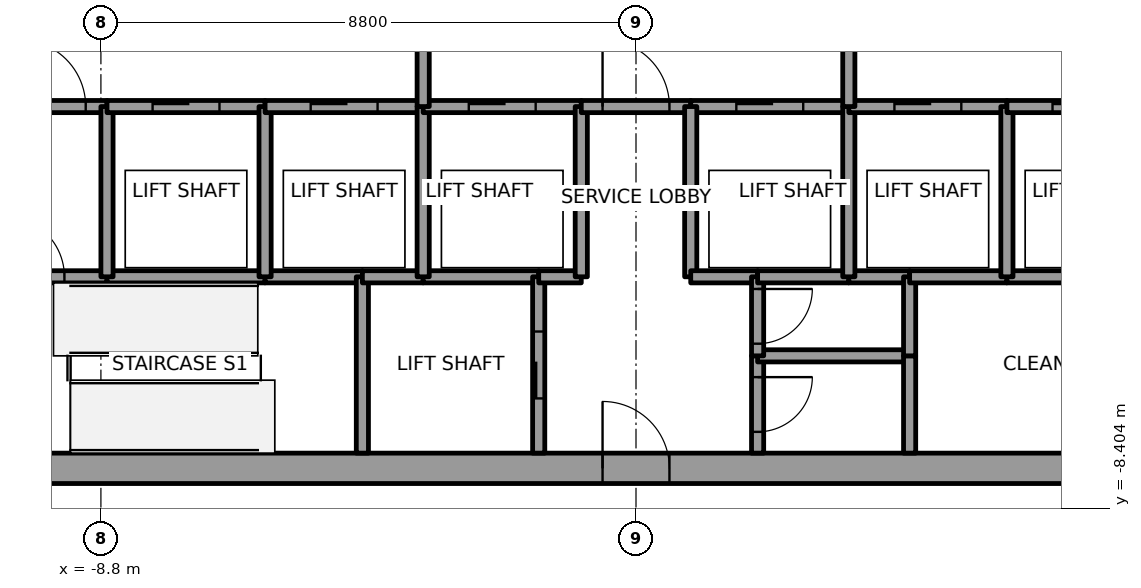
"""IFC4 building model, lengths in metres.
Left out: names, types, materials, properties, quantities, classifications, styles, units other than length and angle.
Written with IfcOpenShell. Run it as: python <this file> out.ifc"""

import sys

from ifc_helpers import new_model, si_unit, direction, frame, frame_2d, origin, place, context, subcontext, project, spatial, rectangle, extrude, element, fill, save


model = new_model("IFC4")
c1 = context("Model", 3, precision=1e-05, world=origin(), true_north=direction((0.0, 1.0)))
c2 = subcontext(c1, "Body", "Model", "MODEL_VIEW")
j1 = project(units=[si_unit("LENGTHUNIT", "METRE"), si_unit("PLANEANGLEUNIT", "RADIAN")], contexts=[c1])
p1 = place(None, origin())
s1 = spatial("IfcSite", under=j1, at=p1, CompositionType="ELEMENT")
p2 = place(p1, origin())
s2 = spatial("IfcBuilding", under=s1, at=p2, CompositionType="ELEMENT")
p3 = place(p2, frame((0.0, 0.0, 227.0)))
s3 = spatial("IfcBuildingStorey", under=s2, at=p3, CompositionType="ELEMENT", Elevation=227.0)
p4 = place(p3, frame((-11.0, -7.75, 0.0), z_axis=(0.0, 0.0, 1.0), x_axis=(1.0, 0.0, 0.0)))
e1 = element("IfcWall", 1, at=p4, inside=s3, PredefinedType="SHEAR", context=c2, shape_type="SweptSolid", body=[
    extrude(rectangle(XDim=22.0, YDim=0.5, at=frame_2d((11.0, 0.0))), origin(), (0.0, 0.0, 1.0), 4.0),
])
p5 = place(p4, frame((10.45, 0.0, 0.0)))
e2 = element("IfcOpeningElement", 2, at=p5, cuts=e1, PredefinedType="OPENING", context=c2, shape_type="SweptSolid", body=[
    extrude(rectangle(XDim=1.1, YDim=2.1, at=frame_2d((0.55, 1.05))), frame((0.0, 0.25, 0.0), z_axis=(0.0, -1.0, 0.0), x_axis=(1.0, 0.0, 0.0)), (0.0, 0.0, 1.0), 0.5),
])
p6 = place(p3, frame((-10.5, -4.6, 0.0), z_axis=(0.0, 0.0, 1.0), x_axis=(1.0, 0.0, 0.0)))
e3 = element("IfcWall", 3, at=p6, inside=s3, PredefinedType="SOLIDWALL", context=c2, shape_type="SweptSolid", body=[
    extrude(rectangle(XDim=1.8, YDim=0.2, at=frame_2d((0.9, 0.0))), origin(), (0.0, 0.0, 1.0), 3.85),
])
p7 = place(p6, frame((0.1, 0.0, 0.0)))
e4 = element("IfcOpeningElement", 4, at=p7, cuts=e3, PredefinedType="OPENING", context=c2, shape_type="SweptSolid", body=[
    extrude(rectangle(XDim=1.0, YDim=2.1, at=frame_2d((0.5, 1.05))), frame((0.0, 0.1, 0.0), z_axis=(0.0, -1.0, 0.0), x_axis=(1.0, 0.0, 0.0)), (0.0, 0.0, 1.0), 0.2),
])
p8 = place(p3, frame((-10.5, -1.8, 0.0), z_axis=(0.0, 0.0, 1.0), x_axis=(1.0, 0.0, 0.0)))
e5 = element("IfcWall", 5, at=p8, inside=s3, PredefinedType="SOLIDWALL", context=c2, shape_type="SweptSolid", body=[
    extrude(rectangle(XDim=1.8, YDim=0.2, at=frame_2d((0.9, 0.0))), origin(), (0.0, 0.0, 1.0), 3.85),
])
p9 = place(p8, frame((0.35, 0.0, 0.0)))
e6 = element("IfcOpeningElement", 6, at=p9, cuts=e5, PredefinedType="OPENING", context=c2, shape_type="SweptSolid", body=[
    extrude(rectangle(XDim=1.1, YDim=2.1, at=frame_2d((0.55, 1.05))), frame((0.0, 0.1, 0.0), z_axis=(0.0, -1.0, 0.0), x_axis=(1.0, 0.0, 0.0)), (0.0, 0.0, 1.0), 0.2),
])
p10 = place(p3, frame((-8.7, -4.6, 0.0), z_axis=(0.0, 0.0, 1.0), x_axis=(1.0, 0.0, 0.0)))
e7 = element("IfcWall", 7, at=p10, inside=s3, PredefinedType="SOLIDWALL", context=c2, shape_type="SweptSolid", body=[
    extrude(rectangle(XDim=2.6, YDim=0.2, at=frame_2d((1.3, 0.0))), origin(), (0.0, 0.0, 1.0), 3.85),
])
p11 = place(p3, frame((-8.7, -4.6, 0.0), z_axis=(0.0, 0.0, 1.0), x_axis=(0.0, 1.0, 0.0)))
e8 = element("IfcWall", 8, at=p11, inside=s3, PredefinedType="SOLIDWALL", context=c2, shape_type="SweptSolid", body=[
    extrude(rectangle(XDim=2.8, YDim=0.2, at=frame_2d((1.4, 0.0))), origin(), (0.0, 0.0, 1.0), 3.85),
])
p12 = place(p3, frame((-8.7, -1.8, 0.0), z_axis=(0.0, 0.0, 1.0), x_axis=(1.0, 0.0, 0.0)))
e9 = element("IfcWall", 9, at=p12, inside=s3, PredefinedType="SOLIDWALL", context=c2, shape_type="SweptSolid", body=[
    extrude(rectangle(XDim=2.6, YDim=0.2, at=frame_2d((1.3, 0.0))), origin(), (0.0, 0.0, 1.0), 3.85),
])
p13 = place(p12, frame((0.75, 0.0, 0.0)))
e10 = element("IfcOpeningElement", 10, at=p13, cuts=e9, PredefinedType="OPENING", context=c2, shape_type="SweptSolid", body=[
    extrude(rectangle(XDim=1.1, YDim=2.1, at=frame_2d((0.55, 1.05))), frame((0.0, 0.1, 0.0), z_axis=(0.0, -1.0, 0.0), x_axis=(1.0, 0.0, 0.0)), (0.0, 0.0, 1.0), 0.2),
])
p14 = place(p3, frame((-6.1, -4.6, 0.0), z_axis=(0.0, 0.0, 1.0), x_axis=(1.0, 0.0, 0.0)))
e11 = element("IfcWall", 11, at=p14, inside=s3, PredefinedType="SOLIDWALL", context=c2, shape_type="SweptSolid", body=[
    extrude(rectangle(XDim=1.6, YDim=0.2, at=frame_2d((0.8, 0.0))), origin(), (0.0, 0.0, 1.0), 3.85),
])
p15 = place(p3, frame((-6.1, -4.6, 0.0), z_axis=(0.0, 0.0, 1.0), x_axis=(0.0, 1.0, 0.0)))
e12 = element("IfcWall", 12, at=p15, inside=s3, PredefinedType="SOLIDWALL", context=c2, shape_type="SweptSolid", body=[
    extrude(rectangle(XDim=2.8, YDim=0.2, at=frame_2d((1.4, 0.0))), origin(), (0.0, 0.0, 1.0), 3.85),
])
p16 = place(p3, frame((-6.1, -1.8, 0.0), z_axis=(0.0, 0.0, 1.0), x_axis=(1.0, 0.0, 0.0)))
e13 = element("IfcWall", 13, at=p16, inside=s3, PredefinedType="SOLIDWALL", context=c2, shape_type="SweptSolid", body=[
    extrude(rectangle(XDim=2.6, YDim=0.2, at=frame_2d((1.3, 0.0))), origin(), (0.0, 0.0, 1.0), 3.85),
])
p17 = place(p16, frame((0.75, 0.0, 0.0)))
e14 = element("IfcOpeningElement", 14, at=p17, cuts=e13, PredefinedType="OPENING", context=c2, shape_type="SweptSolid", body=[
    extrude(rectangle(XDim=1.1, YDim=2.1, at=frame_2d((0.55, 1.05))), frame((0.0, 0.1, 0.0), z_axis=(0.0, -1.0, 0.0), x_axis=(1.0, 0.0, 0.0)), (0.0, 0.0, 1.0), 0.2),
])
p18 = place(p3, frame((-4.5, -4.6, 0.0), z_axis=(0.0, 0.0, 1.0), x_axis=(0.0, -1.0, 0.0)))
e15 = element("IfcWall", 15, at=p18, inside=s3, PredefinedType="SOLIDWALL", context=c2, shape_type="SweptSolid", body=[
    extrude(rectangle(XDim=2.9, YDim=0.2, at=frame_2d((1.45, 0.0))), origin(), (0.0, 0.0, 1.0), 3.85),
])
p19 = place(p3, frame((-4.5, -4.6, 0.0), z_axis=(0.0, 0.0, 1.0), x_axis=(1.0, 0.0, 0.0)))
e16 = element("IfcWall", 16, at=p19, inside=s3, PredefinedType="SOLIDWALL", context=c2, shape_type="SweptSolid", body=[
    extrude(rectangle(XDim=1.0, YDim=0.2, at=frame_2d((0.5, 0.0))), origin(), (0.0, 0.0, 1.0), 3.85),
])
p20 = place(p3, frame((-3.5, -4.6, 0.0), z_axis=(0.0, 0.0, 1.0), x_axis=(1.0, 0.0, 0.0)))
e17 = element("IfcWall", 17, at=p20, inside=s3, PredefinedType="SOLIDWALL", context=c2, shape_type="SweptSolid", body=[
    extrude(rectangle(XDim=1.9, YDim=0.2, at=frame_2d((0.95, 0.0))), origin(), (0.0, 0.0, 1.0), 3.85),
])
p21 = place(p3, frame((-3.5, -4.6, 0.0), z_axis=(0.0, 0.0, 1.0), x_axis=(0.0, 1.0, 0.0)))
e18 = element("IfcWall", 18, at=p21, inside=s3, PredefinedType="SOLIDWALL", context=c2, shape_type="SweptSolid", body=[
    extrude(rectangle(XDim=2.8, YDim=0.2, at=frame_2d((1.4, 0.0))), origin(), (0.0, 0.0, 1.0), 3.85),
])
p22 = place(p3, frame((-3.5, -1.8, 0.0), z_axis=(0.0, 0.0, 1.0), x_axis=(1.0, 0.0, 0.0)))
e19 = element("IfcWall", 19, at=p22, inside=s3, PredefinedType="SOLIDWALL", context=c2, shape_type="SweptSolid", body=[
    extrude(rectangle(XDim=2.6, YDim=0.2, at=frame_2d((1.3, 0.0))), origin(), (0.0, 0.0, 1.0), 3.85),
])
p23 = place(p22, frame((0.75, 0.0, 0.0)))
e20 = element("IfcOpeningElement", 20, at=p23, cuts=e19, PredefinedType="OPENING", context=c2, shape_type="SweptSolid", body=[
    extrude(rectangle(XDim=1.1, YDim=2.1, at=frame_2d((0.55, 1.05))), frame((0.0, 0.1, 0.0), z_axis=(0.0, -1.0, 0.0), x_axis=(1.0, 0.0, 0.0)), (0.0, 0.0, 1.0), 0.2),
])
p24 = place(p3, frame((-3.5, 1.8, 0.0), z_axis=(0.0, 0.0, 1.0), x_axis=(0.0, -1.0, 0.0)))
e21 = element("IfcWall", 21, at=p24, inside=s3, PredefinedType="SOLIDWALL", context=c2, shape_type="SweptSolid", body=[
    extrude(rectangle(XDim=3.6, YDim=0.2, at=frame_2d((1.8, 0.0))), origin(), (0.0, 0.0, 1.0), 3.85),
])
p25 = place(p24, frame((1.05, 0.0, 0.0)))
e22 = element("IfcOpeningElement", 22, at=p25, cuts=e21, PredefinedType="OPENING", context=c2, shape_type="SweptSolid", body=[
    extrude(rectangle(XDim=1.5, YDim=2.1, at=frame_2d((0.75, 1.05))), frame((0.0, 0.1, 0.0), z_axis=(0.0, -1.0, 0.0), x_axis=(1.0, 0.0, 0.0)), (0.0, 0.0, 1.0), 0.2),
])
p26 = place(p3, frame((-1.6, -7.5, 0.0), z_axis=(0.0, 0.0, 1.0), x_axis=(0.0, 1.0, 0.0)))
e23 = element("IfcWall", 23, at=p26, inside=s3, PredefinedType="SOLIDWALL", context=c2, shape_type="SweptSolid", body=[
    extrude(rectangle(XDim=2.9, YDim=0.2, at=frame_2d((1.45, 0.0))), origin(), (0.0, 0.0, 1.0), 3.85),
])
p27 = place(p26, frame((0.9, 0.0, 0.0)))
e24 = element("IfcOpeningElement", 24, at=p27, cuts=e23, PredefinedType="OPENING", context=c2, shape_type="SweptSolid", body=[
    extrude(rectangle(XDim=1.1, YDim=2.1, at=frame_2d((0.55, 1.05))), frame((0.0, 0.1, 0.0), z_axis=(0.0, -1.0, 0.0), x_axis=(1.0, 0.0, 0.0)), (0.0, 0.0, 1.0), 0.2),
])
p28 = place(p3, frame((-1.6, -4.6, 0.0), z_axis=(0.0, 0.0, 1.0), x_axis=(1.0, 0.0, 0.0)))
e25 = element("IfcWall", 25, at=p28, inside=s3, PredefinedType="SOLIDWALL", context=c2, shape_type="SweptSolid", body=[
    extrude(rectangle(XDim=0.7, YDim=0.2, at=frame_2d((0.35, 0.0))), origin(), (0.0, 0.0, 1.0), 3.85),
])
p29 = place(p3, frame((-0.9, -4.6, 0.0), z_axis=(0.0, 0.0, 1.0), x_axis=(0.0, 1.0, 0.0)))
e26 = element("IfcWall", 26, at=p29, inside=s3, PredefinedType="SOLIDWALL", context=c2, shape_type="SweptSolid", body=[
    extrude(rectangle(XDim=2.8, YDim=0.2, at=frame_2d((1.4, 0.0))), origin(), (0.0, 0.0, 1.0), 3.85),
])
p30 = place(p3, frame((-0.9, -1.8, 0.0), z_axis=(0.0, 0.0, 1.0), x_axis=(1.0, 0.0, 0.0)))
e27 = element("IfcWall", 27, at=p30, inside=s3, PredefinedType="SOLIDWALL", context=c2, shape_type="SweptSolid", body=[
    extrude(rectangle(XDim=1.8, YDim=0.2, at=frame_2d((0.9, 0.0))), origin(), (0.0, 0.0, 1.0), 3.85),
])
p31 = place(p30, frame((0.35, 0.0, 0.0)))
e28 = element("IfcOpeningElement", 28, at=p31, cuts=e27, PredefinedType="OPENING", context=c2, shape_type="SweptSolid", body=[
    extrude(rectangle(XDim=1.1, YDim=2.1, at=frame_2d((0.55, 1.05))), frame((0.0, 0.1, 0.0), z_axis=(0.0, -1.0, 0.0), x_axis=(1.0, 0.0, 0.0)), (0.0, 0.0, 1.0), 0.2),
])
p32 = place(p3, frame((0.9, -1.8, 0.0), z_axis=(0.0, 0.0, 1.0), x_axis=(1.0, 0.0, 0.0)))
e29 = element("IfcWall", 29, at=p32, inside=s3, PredefinedType="SOLIDWALL", context=c2, shape_type="SweptSolid", body=[
    extrude(rectangle(XDim=2.6, YDim=0.2, at=frame_2d((1.3, 0.0))), origin(), (0.0, 0.0, 1.0), 3.85),
])
p33 = place(p32, frame((0.75, 0.0, 0.0)))
e30 = element("IfcOpeningElement", 30, at=p33, cuts=e29, PredefinedType="OPENING", context=c2, shape_type="SweptSolid", body=[
    extrude(rectangle(XDim=1.1, YDim=2.1, at=frame_2d((0.55, 1.05))), frame((0.0, 0.1, 0.0), z_axis=(0.0, -1.0, 0.0), x_axis=(1.0, 0.0, 0.0)), (0.0, 0.0, 1.0), 0.2),
])
p34 = place(p3, frame((0.9, -1.8, 0.0), z_axis=(0.0, 0.0, 1.0), x_axis=(0.0, -1.0, 0.0)))
e31 = element("IfcWall", 31, at=p34, inside=s3, PredefinedType="SOLIDWALL", context=c2, shape_type="SweptSolid", body=[
    extrude(rectangle(XDim=2.8, YDim=0.2, at=frame_2d((1.4, 0.0))), origin(), (0.0, 0.0, 1.0), 3.85),
])
p35 = place(p3, frame((0.9, -4.6, 0.0), z_axis=(0.0, 0.0, 1.0), x_axis=(1.0, 0.0, 0.0)))
e32 = element("IfcWall", 32, at=p35, inside=s3, PredefinedType="SOLIDWALL", context=c2, shape_type="SweptSolid", body=[
    extrude(rectangle(XDim=1.1, YDim=0.2, at=frame_2d((0.55, 0.0))), origin(), (0.0, 0.0, 1.0), 3.85),
])
p36 = place(p3, frame((2.0, -5.9, 0.0), z_axis=(0.0, 0.0, 1.0), x_axis=(0.0, -1.0, 0.0)))
e33 = element("IfcWall", 33, at=p36, inside=s3, PredefinedType="SOLIDWALL", context=c2, shape_type="SweptSolid", body=[
    extrude(rectangle(XDim=1.6, YDim=0.2, at=frame_2d((0.8, 0.0))), origin(), (0.0, 0.0, 1.0), 3.85),
])
p37 = place(p36, frame((0.35, 0.0, 0.0)))
e34 = element("IfcOpeningElement", 34, at=p37, cuts=e33, PredefinedType="OPENING", context=c2, shape_type="SweptSolid", body=[
    extrude(rectangle(XDim=0.9, YDim=2.1, at=frame_2d((0.45, 1.05))), frame((0.0, 0.1, 0.0), z_axis=(0.0, -1.0, 0.0), x_axis=(1.0, 0.0, 0.0)), (0.0, 0.0, 1.0), 0.2),
])
p38 = place(p3, frame((4.5, -5.9, 0.0), z_axis=(0.0, 0.0, 1.0), x_axis=(-1.0, 0.0, 0.0)))
e35 = element("IfcWall", 35, at=p38, inside=s3, PredefinedType="SOLIDWALL", context=c2, shape_type="SweptSolid", body=[
    extrude(rectangle(XDim=2.5, YDim=0.2, at=frame_2d((1.25, 0.0))), origin(), (0.0, 0.0, 1.0), 3.85),
])
p39 = place(p3, frame((2.0, -4.6, 0.0), z_axis=(0.0, 0.0, 1.0), x_axis=(0.0, -1.0, 0.0)))
e36 = element("IfcWall", 36, at=p39, inside=s3, PredefinedType="SOLIDWALL", context=c2, shape_type="SweptSolid", body=[
    extrude(rectangle(XDim=1.3, YDim=0.2, at=frame_2d((0.65, 0.0))), origin(), (0.0, 0.0, 1.0), 3.85),
])
p40 = place(p39, frame((0.2, 0.0, 0.0)))
e37 = element("IfcOpeningElement", 37, at=p40, cuts=e36, PredefinedType="OPENING", context=c2, shape_type="SweptSolid", body=[
    extrude(rectangle(XDim=0.9, YDim=2.1, at=frame_2d((0.45, 1.05))), frame((0.0, 0.1, 0.0), z_axis=(0.0, -1.0, 0.0), x_axis=(1.0, 0.0, 0.0)), (0.0, 0.0, 1.0), 0.2),
])
p41 = place(p3, frame((3.5, -4.6, 0.0), z_axis=(0.0, 0.0, 1.0), x_axis=(-1.0, 0.0, 0.0)))
e38 = element("IfcWall", 38, at=p41, inside=s3, PredefinedType="SOLIDWALL", context=c2, shape_type="SweptSolid", body=[
    extrude(rectangle(XDim=1.5, YDim=0.2, at=frame_2d((0.75, 0.0))), origin(), (0.0, 0.0, 1.0), 3.85),
])
p42 = place(p3, frame((4.5, -4.6, 0.0), z_axis=(0.0, 0.0, 1.0), x_axis=(-1.0, 0.0, 0.0)))
e39 = element("IfcWall", 39, at=p42, inside=s3, PredefinedType="SOLIDWALL", context=c2, shape_type="SweptSolid", body=[
    extrude(rectangle(XDim=1.0, YDim=0.2, at=frame_2d((0.5, 0.0))), origin(), (0.0, 0.0, 1.0), 3.85),
])
p43 = place(p3, frame((3.5, -4.6, 0.0), z_axis=(0.0, 0.0, 1.0), x_axis=(0.0, 1.0, 0.0)))
e40 = element("IfcWall", 40, at=p43, inside=s3, PredefinedType="SOLIDWALL", context=c2, shape_type="SweptSolid", body=[
    extrude(rectangle(XDim=2.8, YDim=0.2, at=frame_2d((1.4, 0.0))), origin(), (0.0, 0.0, 1.0), 3.85),
])
p44 = place(p3, frame((3.5, -1.8, 0.0), z_axis=(0.0, 0.0, 1.0), x_axis=(1.0, 0.0, 0.0)))
e41 = element("IfcWall", 41, at=p44, inside=s3, PredefinedType="SOLIDWALL", context=c2, shape_type="SweptSolid", body=[
    extrude(rectangle(XDim=2.6, YDim=0.2, at=frame_2d((1.3, 0.0))), origin(), (0.0, 0.0, 1.0), 3.85),
])
p45 = place(p44, frame((0.75, 0.0, 0.0)))
e42 = element("IfcOpeningElement", 42, at=p45, cuts=e41, PredefinedType="OPENING", context=c2, shape_type="SweptSolid", body=[
    extrude(rectangle(XDim=1.1, YDim=2.1, at=frame_2d((0.55, 1.05))), frame((0.0, 0.1, 0.0), z_axis=(0.0, -1.0, 0.0), x_axis=(1.0, 0.0, 0.0)), (0.0, 0.0, 1.0), 0.2),
])
p46 = place(p3, frame((3.5, -1.8, 0.0), z_axis=(0.0, 0.0, 1.0), x_axis=(0.0, 1.0, 0.0)))
e43 = element("IfcWall", 43, at=p46, inside=s3, PredefinedType="SOLIDWALL", context=c2, shape_type="SweptSolid", body=[
    extrude(rectangle(XDim=3.6, YDim=0.2, at=frame_2d((1.8, 0.0))), origin(), (0.0, 0.0, 1.0), 3.85),
])
p47 = place(p46, frame((1.05, 0.0, 0.0)))
e44 = element("IfcOpeningElement", 44, at=p47, cuts=e43, PredefinedType="OPENING", context=c2, shape_type="SweptSolid", body=[
    extrude(rectangle(XDim=1.5, YDim=2.1, at=frame_2d((0.75, 1.05))), frame((0.0, 0.1, 0.0), z_axis=(0.0, -1.0, 0.0), x_axis=(1.0, 0.0, 0.0)), (0.0, 0.0, 1.0), 0.2),
])
p48 = place(p3, frame((4.5, -5.9, 0.0), z_axis=(0.0, 0.0, 1.0), x_axis=(0.0, -1.0, 0.0)))
e45 = element("IfcWall", 45, at=p48, inside=s3, PredefinedType="SOLIDWALL", context=c2, shape_type="SweptSolid", body=[
    extrude(rectangle(XDim=1.6, YDim=0.2, at=frame_2d((0.8, 0.0))), origin(), (0.0, 0.0, 1.0), 3.85),
])
p49 = place(p3, frame((4.5, -4.6, 0.0), z_axis=(0.0, 0.0, 1.0), x_axis=(0.0, -1.0, 0.0)))
e46 = element("IfcWall", 46, at=p49, inside=s3, PredefinedType="SOLIDWALL", context=c2, shape_type="SweptSolid", body=[
    extrude(rectangle(XDim=1.3, YDim=0.2, at=frame_2d((0.65, 0.0))), origin(), (0.0, 0.0, 1.0), 3.85),
])
p50 = place(p3, frame((6.1, -4.6, 0.0), z_axis=(0.0, 0.0, 1.0), x_axis=(-1.0, 0.0, 0.0)))
e47 = element("IfcWall", 47, at=p50, inside=s3, PredefinedType="SOLIDWALL", context=c2, shape_type="SweptSolid", body=[
    extrude(rectangle(XDim=1.6, YDim=0.2, at=frame_2d((0.8, 0.0))), origin(), (0.0, 0.0, 1.0), 3.85),
])
p51 = place(p3, frame((8.7, -4.6, 0.0), z_axis=(0.0, 0.0, 1.0), x_axis=(-1.0, 0.0, 0.0)))
e48 = element("IfcWall", 48, at=p51, inside=s3, PredefinedType="SOLIDWALL", context=c2, shape_type="SweptSolid", body=[
    extrude(rectangle(XDim=2.6, YDim=0.2, at=frame_2d((1.3, 0.0))), origin(), (0.0, 0.0, 1.0), 3.85),
])
p52 = place(p3, frame((6.1, -4.6, 0.0), z_axis=(0.0, 0.0, 1.0), x_axis=(0.0, 1.0, 0.0)))
e49 = element("IfcWall", 49, at=p52, inside=s3, PredefinedType="SOLIDWALL", context=c2, shape_type="SweptSolid", body=[
    extrude(rectangle(XDim=2.8, YDim=0.2, at=frame_2d((1.4, 0.0))), origin(), (0.0, 0.0, 1.0), 3.85),
])
p53 = place(p3, frame((6.1, -1.8, 0.0), z_axis=(0.0, 0.0, 1.0), x_axis=(1.0, 0.0, 0.0)))
e50 = element("IfcWall", 50, at=p53, inside=s3, PredefinedType="SOLIDWALL", context=c2, shape_type="SweptSolid", body=[
    extrude(rectangle(XDim=2.6, YDim=0.2, at=frame_2d((1.3, 0.0))), origin(), (0.0, 0.0, 1.0), 3.85),
])
p54 = place(p53, frame((0.75, 0.0, 0.0)))
e51 = element("IfcOpeningElement", 51, at=p54, cuts=e50, PredefinedType="OPENING", context=c2, shape_type="SweptSolid", body=[
    extrude(rectangle(XDim=1.1, YDim=2.1, at=frame_2d((0.55, 1.05))), frame((0.0, 0.1, 0.0), z_axis=(0.0, -1.0, 0.0), x_axis=(1.0, 0.0, 0.0)), (0.0, 0.0, 1.0), 0.2),
])
p55 = place(p13, origin())
e52 = element("IfcDoor", 52, at=p55, inside=s3, OperationType="SLIDING_TO_LEFT", PredefinedType="DOOR", context=c2, shape_type="SweptSolid", body=[
    extrude(rectangle(XDim=1.1, YDim=2.1, at=frame_2d((0.55, 1.05))), frame((0.0, 0.025, 0.0), z_axis=(0.0, -1.0, 0.0), x_axis=(1.0, 0.0, 0.0)), (0.0, 0.0, 1.0), 0.05),
])
fill(e10, e52)
p56 = place(p17, origin())
e53 = element("IfcDoor", 53, at=p56, inside=s3, OperationType="SLIDING_TO_RIGHT", PredefinedType="DOOR", context=c2, shape_type="SweptSolid", body=[
    extrude(rectangle(XDim=1.1, YDim=2.1, at=frame_2d((0.55, 1.05))), frame((0.0, 0.025, 0.0), z_axis=(0.0, -1.0, 0.0), x_axis=(1.0, 0.0, 0.0)), (0.0, 0.0, 1.0), 0.05),
])
fill(e14, e53)
p57 = place(p23, origin())
e54 = element("IfcDoor", 54, at=p57, inside=s3, OperationType="SLIDING_TO_RIGHT", PredefinedType="DOOR", context=c2, shape_type="SweptSolid", body=[
    extrude(rectangle(XDim=1.1, YDim=2.1, at=frame_2d((0.55, 1.05))), frame((0.0, 0.025, 0.0), z_axis=(0.0, -1.0, 0.0), x_axis=(1.0, 0.0, 0.0)), (0.0, 0.0, 1.0), 0.05),
])
fill(e20, e54)
p58 = place(p33, origin())
e55 = element("IfcDoor", 55, at=p58, inside=s3, OperationType="SLIDING_TO_LEFT", PredefinedType="DOOR", context=c2, shape_type="SweptSolid", body=[
    extrude(rectangle(XDim=1.1, YDim=2.1, at=frame_2d((0.55, 1.05))), frame((0.0, 0.025, 0.0), z_axis=(0.0, -1.0, 0.0), x_axis=(1.0, 0.0, 0.0)), (0.0, 0.0, 1.0), 0.05),
])
fill(e30, e55)
p59 = place(p45, origin())
e56 = element("IfcDoor", 56, at=p59, inside=s3, OperationType="SLIDING_TO_RIGHT", PredefinedType="DOOR", context=c2, shape_type="SweptSolid", body=[
    extrude(rectangle(XDim=1.1, YDim=2.1, at=frame_2d((0.55, 1.05))), frame((0.0, 0.025, 0.0), z_axis=(0.0, -1.0, 0.0), x_axis=(1.0, 0.0, 0.0)), (0.0, 0.0, 1.0), 0.05),
])
fill(e42, e56)
p60 = place(p54, origin())
e57 = element("IfcDoor", 57, at=p60, inside=s3, OperationType="SLIDING_TO_LEFT", PredefinedType="DOOR", context=c2, shape_type="SweptSolid", body=[
    extrude(rectangle(XDim=1.1, YDim=2.1, at=frame_2d((0.55, 1.05))), frame((0.0, 0.025, 0.0), z_axis=(0.0, -1.0, 0.0), x_axis=(1.0, 0.0, 0.0)), (0.0, 0.0, 1.0), 0.05),
])
fill(e51, e57)
p61 = place(p27, origin())
e58 = element("IfcDoor", 58, at=p61, inside=s3, OperationType="SLIDING_TO_RIGHT", PredefinedType="DOOR", context=c2, shape_type="SweptSolid", body=[
    extrude(rectangle(XDim=1.1, YDim=2.1, at=frame_2d((0.55, 1.05))), frame((0.0, 0.025, 0.0), z_axis=(0.0, -1.0, 0.0), x_axis=(1.0, 0.0, 0.0)), (0.0, 0.0, 1.0), 0.05),
])
fill(e24, e58)
p62 = place(p9, origin())
e59 = element("IfcDoor", 59, at=p62, inside=s3, OperationType="SINGLE_SWING_LEFT", PredefinedType="DOOR", context=c2, shape_type="SweptSolid", body=[
    extrude(rectangle(XDim=1.1, YDim=2.1, at=frame_2d((0.55, 1.05))), frame((0.0, 0.025, 0.0), z_axis=(0.0, -1.0, 0.0), x_axis=(1.0, 0.0, 0.0)), (0.0, 0.0, 1.0), 0.05),
])
fill(e6, e59)
p63 = place(p31, origin())
e60 = element("IfcDoor", 60, at=p63, inside=s3, OperationType="SINGLE_SWING_RIGHT", PredefinedType="DOOR", context=c2, shape_type="SweptSolid", body=[
    extrude(rectangle(XDim=1.1, YDim=2.1, at=frame_2d((0.55, 1.05))), frame((0.0, 0.025, 0.0), z_axis=(0.0, -1.0, 0.0), x_axis=(1.0, 0.0, 0.0)), (0.0, 0.0, 1.0), 0.05),
])
fill(e28, e60)
p64 = place(p7, origin())
e61 = element("IfcDoor", 61, at=p64, inside=s3, OperationType="SINGLE_SWING_LEFT", PredefinedType="DOOR", context=c2, shape_type="SweptSolid", body=[
    extrude(rectangle(XDim=1.0, YDim=2.1, at=frame_2d((0.5, 1.05))), frame((0.0, 0.025, 0.0), z_axis=(0.0, -1.0, 0.0), x_axis=(1.0, 0.0, 0.0)), (0.0, 0.0, 1.0), 0.05),
])
fill(e4, e61)
p65 = place(p37, origin())
e62 = element("IfcDoor", 62, at=p65, inside=s3, OperationType="SINGLE_SWING_LEFT", PredefinedType="DOOR", context=c2, shape_type="SweptSolid", body=[
    extrude(rectangle(XDim=0.9, YDim=2.1, at=frame_2d((0.45, 1.05))), frame((0.0, 0.025, 0.0), z_axis=(0.0, -1.0, 0.0), x_axis=(1.0, 0.0, 0.0)), (0.0, 0.0, 1.0), 0.05),
])
fill(e34, e62)
p66 = place(p40, origin())
e63 = element("IfcDoor", 63, at=p66, inside=s3, OperationType="SINGLE_SWING_LEFT", PredefinedType="DOOR", context=c2, shape_type="SweptSolid", body=[
    extrude(rectangle(XDim=0.9, YDim=2.1, at=frame_2d((0.45, 1.05))), frame((0.0, 0.025, 0.0), z_axis=(0.0, -1.0, 0.0), x_axis=(1.0, 0.0, 0.0)), (0.0, 0.0, 1.0), 0.05),
])
fill(e37, e63)
p67 = place(p5, origin())
e64 = element("IfcDoor", 64, at=p67, inside=s3, OperationType="SINGLE_SWING_RIGHT", PredefinedType="DOOR", context=c2, shape_type="SweptSolid", body=[
    extrude(rectangle(XDim=1.1, YDim=2.1, at=frame_2d((0.55, 1.05))), frame((0.0, 0.025, 0.0), z_axis=(0.0, -1.0, 0.0), x_axis=(1.0, 0.0, 0.0)), (0.0, 0.0, 1.0), 0.05),
])
fill(e2, e64)
save(model, sys.argv[1])
